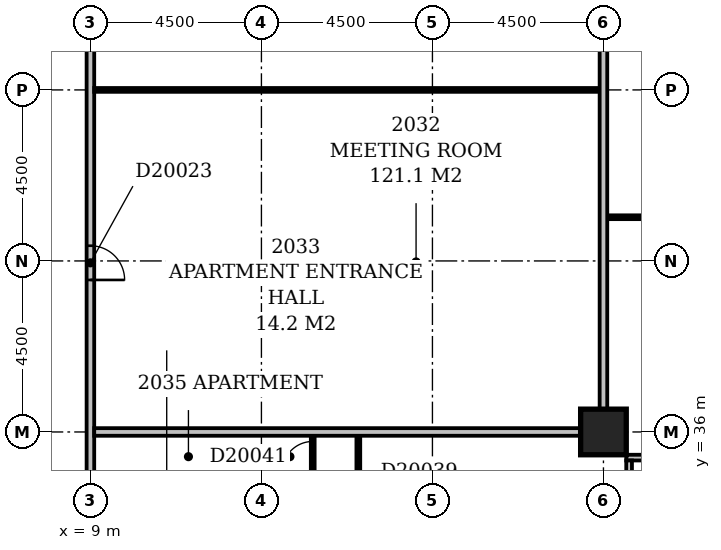
"""IFC4 building model, lengths in metres.
Left out: names, types, materials, properties, quantities, classifications, styles, units other than length and angle.
Written with IfcOpenShell. Run it as: python <this file> out.ifc"""

import sys

from ifc_helpers import new_model, si_unit, direction, frame, frame_2d, origin, origin_2d, place, context, subcontext, project, spatial, rectangle, extrude, element, fill, save


model = new_model("IFC4")
c1 = context("Model", 3, precision=1e-05, world=origin(), true_north=direction((0.0, 1.0)))
c2 = subcontext(c1, "Body", "Model", "MODEL_VIEW")
j1 = project(units=[si_unit("LENGTHUNIT", "METRE"), si_unit("PLANEANGLEUNIT", "RADIAN")], contexts=[c1])
p1 = place(None, origin())
s1 = spatial("IfcSite", under=j1, at=p1, CompositionType="ELEMENT")
p2 = place(p1, origin())
s2 = spatial("IfcBuilding", under=s1, at=p2, CompositionType="ELEMENT")
p3 = place(p2, frame((0.0, 0.0, 83.0)))
s3 = spatial("IfcBuildingStorey", under=s2, at=p3, CompositionType="ELEMENT", Elevation=83.0)
p4 = place(p3, frame((22.5, 36.0, -0.3), z_axis=(0.0, 0.0, 1.0), x_axis=(1.0, 0.0, 0.0)))
e1 = element("IfcColumn", 1, at=p4, inside=s3, PredefinedType="COLUMN", context=c2, shape_type="SweptSolid", body=[
    extrude(rectangle(XDim=1.2, YDim=1.2, at=origin_2d()), origin(), (0.0, 0.0, 1.0), 3.6),
])
p5 = place(p3, frame((23.175, 17.4, 0.0), z_axis=(0.0, 0.0, 1.0), x_axis=(0.0, 1.0, 0.0)))
e2 = element("IfcWall", 2, at=p5, inside=s3, PredefinedType="STANDARD", context=c2, shape_type="SweptSolid", body=[
    extrude(rectangle(XDim=17.85, YDim=0.15, at=frame_2d((8.925, 0.0))), origin(), (0.0, 0.0, 1.0), 2.7),
])
p6 = place(p5, frame((1.65, 0.0, 0.6)))
e3 = element("IfcOpeningElement", 3, at=p6, cuts=e2, PredefinedType="OPENING", context=c2, shape_type="SweptSolid", body=[
    extrude(rectangle(XDim=2.4, YDim=1.8, at=frame_2d((1.2, 0.9))), frame((0.0, 0.087, 0.0), z_axis=(0.0, -1.0, 0.0), x_axis=(1.0, 0.0, 0.0)), (0.0, 0.0, 1.0), 0.174),
])
p7 = place(p5, frame((5.926, 0.0, 0.6)))
e4 = element("IfcOpeningElement", 4, at=p7, cuts=e2, PredefinedType="OPENING", context=c2, shape_type="SweptSolid", body=[
    extrude(rectangle(XDim=0.45, YDim=1.8, at=frame_2d((0.225, 0.9))), frame((0.0, 0.087, 0.0), z_axis=(0.0, -1.0, 0.0), x_axis=(1.0, 0.0, 0.0)), (0.0, 0.0, 1.0), 0.174),
])
p8 = place(p5, frame((10.65, 0.0, 0.6)))
e5 = element("IfcOpeningElement", 5, at=p8, cuts=e2, PredefinedType="OPENING", context=c2, shape_type="SweptSolid", body=[
    extrude(rectangle(XDim=2.4, YDim=1.8, at=frame_2d((1.2, 0.9))), frame((0.0, 0.087, 0.0), z_axis=(0.0, -1.0, 0.0), x_axis=(1.0, 0.0, 0.0)), (0.0, 0.0, 1.0), 0.174),
])
p9 = place(p5, frame((15.15, 0.0, 0.6)))
e6 = element("IfcOpeningElement", 6, at=p9, cuts=e2, PredefinedType="OPENING", context=c2, shape_type="SweptSolid", body=[
    extrude(rectangle(XDim=2.4, YDim=1.8, at=frame_2d((1.2, 0.9))), frame((0.0, 0.087, 0.0), z_axis=(0.0, -1.0, 0.0), x_axis=(1.0, 0.0, 0.0)), (0.0, 0.0, 1.0), 0.174),
])
p10 = place(p3, frame((23.1, 35.325, 0.0), z_axis=(0.0, 0.0, 1.0), x_axis=(1.0, 0.0, 0.0)))
e7 = element("IfcWall", 7, at=p10, inside=s3, PredefinedType="STANDARD", context=c2, shape_type="SweptSolid", body=[
    extrude(rectangle(XDim=45.15, YDim=0.15, at=frame_2d((22.575, 0.0))), origin(), (0.0, 0.0, 1.0), 2.7),
])
p11 = place(p10, frame((0.45, 0.0, 0.6)))
e8 = element("IfcOpeningElement", 8, at=p11, cuts=e7, PredefinedType="OPENING", context=c2, shape_type="SweptSolid", body=[
    extrude(rectangle(XDim=2.4, YDim=1.8, at=frame_2d((1.2, 0.9))), frame((0.0, 0.087, 0.0), z_axis=(0.0, -1.0, 0.0), x_axis=(1.0, 0.0, 0.0)), (0.0, 0.0, 1.0), 0.174),
])
p12 = place(p10, frame((6.366, 0.0, 0.6)))
e9 = element("IfcOpeningElement", 9, at=p12, cuts=e7, PredefinedType="OPENING", context=c2, shape_type="SweptSolid", body=[
    extrude(rectangle(XDim=1.2, YDim=1.8, at=frame_2d((0.6, 0.9))), frame((0.0, 0.087, 0.0), z_axis=(0.0, -1.0, 0.0), x_axis=(1.0, 0.0, 0.0)), (0.0, 0.0, 1.0), 0.174),
])
p13 = place(p10, frame((9.45, 0.0, 0.6)))
e10 = element("IfcOpeningElement", 10, at=p13, cuts=e7, PredefinedType="OPENING", context=c2, shape_type="SweptSolid", body=[
    extrude(rectangle(XDim=2.4, YDim=1.8, at=frame_2d((1.2, 0.9))), frame((0.0, 0.087, 0.0), z_axis=(0.0, -1.0, 0.0), x_axis=(1.0, 0.0, 0.0)), (0.0, 0.0, 1.0), 0.174),
])
p14 = place(p10, frame((13.95, 0.0, 0.6)))
e11 = element("IfcOpeningElement", 11, at=p14, cuts=e7, PredefinedType="OPENING", context=c2, shape_type="SweptSolid", body=[
    extrude(rectangle(XDim=2.4, YDim=1.8, at=frame_2d((1.2, 0.9))), frame((0.0, 0.087, 0.0), z_axis=(0.0, -1.0, 0.0), x_axis=(1.0, 0.0, 0.0)), (0.0, 0.0, 1.0), 0.174),
])
p15 = place(p10, frame((18.21, 0.0, 0.6)))
e12 = element("IfcOpeningElement", 12, at=p15, cuts=e7, PredefinedType="OPENING", context=c2, shape_type="SweptSolid", body=[
    extrude(rectangle(XDim=1.8, YDim=1.8, at=frame_2d((0.9, 0.9))), frame((0.0, 0.087, 0.0), z_axis=(0.0, -1.0, 0.0), x_axis=(1.0, 0.0, 0.0)), (0.0, 0.0, 1.0), 0.174),
])
p16 = place(p10, frame((22.95, 0.0, 0.6)))
e13 = element("IfcOpeningElement", 13, at=p16, cuts=e7, PredefinedType="OPENING", context=c2, shape_type="SweptSolid", body=[
    extrude(rectangle(XDim=2.4, YDim=1.8, at=frame_2d((1.2, 0.9))), frame((0.0, 0.087, 0.0), z_axis=(0.0, -1.0, 0.0), x_axis=(1.0, 0.0, 0.0)), (0.0, 0.0, 1.0), 0.174),
])
p17 = place(p10, frame((27.45, 0.0, 0.6)))
e14 = element("IfcOpeningElement", 14, at=p17, cuts=e7, PredefinedType="OPENING", context=c2, shape_type="SweptSolid", body=[
    extrude(rectangle(XDim=2.4, YDim=1.8, at=frame_2d((1.2, 0.9))), frame((0.0, 0.087, 0.0), z_axis=(0.0, -1.0, 0.0), x_axis=(1.0, 0.0, 0.0)), (0.0, 0.0, 1.0), 0.174),
])
p18 = place(p10, frame((31.831, 0.0, 0.6)))
e15 = element("IfcOpeningElement", 15, at=p18, cuts=e7, PredefinedType="OPENING", context=c2, shape_type="SweptSolid", body=[
    extrude(rectangle(XDim=0.6, YDim=1.8, at=frame_2d((0.3, 0.9))), frame((0.0, 0.087, 0.0), z_axis=(0.0, -1.0, 0.0), x_axis=(1.0, 0.0, 0.0)), (0.0, 0.0, 1.0), 0.174),
])
p19 = place(p10, frame((36.45, 0.0, 0.6)))
e16 = element("IfcOpeningElement", 16, at=p19, cuts=e7, PredefinedType="OPENING", context=c2, shape_type="SweptSolid", body=[
    extrude(rectangle(XDim=2.4, YDim=1.8, at=frame_2d((1.2, 0.9))), frame((0.0, 0.087, 0.0), z_axis=(0.0, -1.0, 0.0), x_axis=(1.0, 0.0, 0.0)), (0.0, 0.0, 1.0), 0.174),
])
p20 = place(p10, frame((40.95, 0.0, 0.6)))
e17 = element("IfcOpeningElement", 17, at=p20, cuts=e7, PredefinedType="OPENING", context=c2, shape_type="SweptSolid", body=[
    extrude(rectangle(XDim=2.4, YDim=1.8, at=frame_2d((1.2, 0.9))), frame((0.0, 0.087, 0.0), z_axis=(0.0, -1.0, 0.0), x_axis=(1.0, 0.0, 0.0)), (0.0, 0.0, 1.0), 0.174),
])
p21 = place(p3, frame((9.0, 5.0, 0.0), z_axis=(0.0, 0.0, 1.0), x_axis=(0.0, 1.0, 0.0)))
e18 = element("IfcWall", 18, at=p21, inside=s3, PredefinedType="PARTITIONING", context=c2, shape_type="SweptSolid", body=[
    extrude(rectangle(XDim=44.5, YDim=0.2, at=frame_2d((22.25, 0.0))), origin(), (0.0, 0.0, 1.0), 3.3),
])
p22 = place(p21, frame((28.45, 0.0, 0.0)))
e19 = element("IfcOpeningElement", 19, at=p22, cuts=e18, PredefinedType="OPENING", context=c2, shape_type="SweptSolid", body=[
    extrude(rectangle(XDim=1.0, YDim=2.1, at=frame_2d((0.5, 1.05))), frame((0.0, 0.112, 0.0), z_axis=(0.0, -1.0, 0.0), x_axis=(1.0, 0.0, 0.0)), (0.0, 0.0, 1.0), 0.224),
])
p23 = place(p21, frame((22.8, 0.0, 0.0)))
e20 = element("IfcOpeningElement", 20, at=p23, cuts=e18, PredefinedType="OPENING", context=c2, shape_type="SweptSolid", body=[
    extrude(rectangle(XDim=1.0, YDim=2.1, at=frame_2d((0.5, 1.05))), frame((0.0, 0.112, 0.0), z_axis=(0.0, -1.0, 0.0), x_axis=(1.0, 0.0, 0.0)), (0.0, 0.0, 1.0), 0.224),
])
p24 = place(p21, frame((14.55, 0.0, 0.0)))
e21 = element("IfcOpeningElement", 21, at=p24, cuts=e18, PredefinedType="OPENING", context=c2, shape_type="SweptSolid", body=[
    extrude(rectangle(XDim=1.0, YDim=2.1, at=frame_2d((0.5, 1.05))), frame((0.0, 0.112, 0.0), z_axis=(0.0, -1.0, 0.0), x_axis=(1.0, 0.0, 0.0)), (0.0, 0.0, 1.0), 0.224),
])
p25 = place(p21, frame((9.3, 0.0, 0.0)))
e22 = element("IfcOpeningElement", 22, at=p25, cuts=e18, PredefinedType="OPENING", context=c2, shape_type="SweptSolid", body=[
    extrude(rectangle(XDim=1.0, YDim=2.1, at=frame_2d((0.5, 1.05))), frame((0.0, 0.112, 0.0), z_axis=(0.0, -1.0, 0.0), x_axis=(1.0, 0.0, 0.0)), (0.0, 0.0, 1.0), 0.224),
])
p26 = place(p21, frame((35.0, 0.0, 0.0)))
e23 = element("IfcOpeningElement", 23, at=p26, cuts=e18, PredefinedType="OPENING", context=c2, shape_type="SweptSolid", body=[
    extrude(rectangle(XDim=0.9, YDim=2.1, at=frame_2d((0.45, 1.05))), frame((0.0, 0.112, 0.0), z_axis=(0.0, -1.0, 0.0), x_axis=(1.0, 0.0, 0.0)), (0.0, 0.0, 1.0), 0.224),
])
p27 = place(p21, frame((1.5, 0.0, 0.0)))
e24 = element("IfcOpeningElement", 24, at=p27, cuts=e18, PredefinedType="OPENING", context=c2, shape_type="SweptSolid", body=[
    extrude(rectangle(XDim=0.9, YDim=2.1, at=frame_2d((0.45, 1.05))), frame((0.0, 0.112, 0.0), z_axis=(0.0, -1.0, 0.0), x_axis=(1.0, 0.0, 0.0)), (0.0, 0.0, 1.0), 0.224),
])
p28 = place(p3, frame((16.05, 31.6, 0.0), z_axis=(0.0, 0.0, 1.0), x_axis=(0.0, 1.0, 0.0)))
e25 = element("IfcWall", 25, at=p28, inside=s3, PredefinedType="PARTITIONING", context=c2, shape_type="SweptSolid", body=[
    extrude(rectangle(XDim=4.3, YDim=0.1, at=frame_2d((2.15, 0.0))), origin(), (0.0, 0.0, 1.0), 3.3),
])
p29 = place(p28, frame((1.7, 0.0, 0.0)))
e26 = element("IfcOpeningElement", 26, at=p29, cuts=e25, PredefinedType="OPENING", context=c2, shape_type="SweptSolid", body=[
    extrude(rectangle(XDim=0.9, YDim=2.1, at=frame_2d((0.45, 1.05))), frame((0.0, 0.062, 0.0), z_axis=(0.0, -1.0, 0.0), x_axis=(1.0, 0.0, 0.0)), (0.0, 0.0, 1.0), 0.124),
])
p30 = place(p3, frame((14.85, 34.7, 0.0), z_axis=(0.0, 0.0, 1.0), x_axis=(0.0, 1.0, 0.0)))
e27 = element("IfcWall", 27, at=p30, inside=s3, PredefinedType="PARTITIONING", context=c2, shape_type="SweptSolid", body=[
    extrude(rectangle(XDim=1.2, YDim=0.1, at=frame_2d((0.6, 0.0))), origin(), (0.0, 0.0, 1.0), 3.3),
])
p31 = place(p30, frame((0.25, 0.0, 0.0)))
e28 = element("IfcOpeningElement", 28, at=p31, cuts=e27, PredefinedType="OPENING", context=c2, shape_type="SweptSolid", body=[
    extrude(rectangle(XDim=0.8, YDim=2.1, at=frame_2d((0.4, 1.05))), frame((0.0, 0.062, 0.0), z_axis=(0.0, -1.0, 0.0), x_axis=(1.0, 0.0, 0.0)), (0.0, 0.0, 1.0), 0.124),
])
p32 = place(p3, frame((9.1, 36.0, 0.0), z_axis=(0.0, 0.0, 1.0), x_axis=(1.0, 0.0, 0.0)))
e29 = element("IfcWall", 29, at=p32, inside=s3, PredefinedType="PARTITIONING", context=c2, shape_type="SweptSolid", body=[
    extrude(rectangle(XDim=12.8, YDim=0.2, at=frame_2d((6.4, 0.0))), origin(), (0.0, 0.0, 1.0), 2.4),
])
p33 = place(p3, frame((22.5, 36.6, 0.0), z_axis=(0.0, 0.0, 1.0), x_axis=(0.0, 1.0, 0.0)))
e30 = element("IfcWall", 30, at=p33, inside=s3, PredefinedType="PARTITIONING", context=c2, shape_type="SweptSolid", body=[
    extrude(rectangle(XDim=12.8, YDim=0.2, at=frame_2d((6.4, 0.0))), origin(), (0.0, 0.0, 1.0), 3.3),
])
p34 = place(p3, frame((22.6, 41.65, 0.0), z_axis=(0.0, 0.0, 1.0), x_axis=(1.0, 0.0, 0.0)))
e31 = element("IfcWall", 31, at=p34, inside=s3, PredefinedType="PARTITIONING", context=c2, shape_type="SweptSolid", body=[
    extrude(rectangle(XDim=8.8, YDim=0.1, at=frame_2d((4.4, 0.0))), origin(), (0.0, 0.0, 1.0), 3.3),
])
p35 = place(p34, frame((1.7, 0.0, 0.0)))
e32 = element("IfcOpeningElement", 32, at=p35, cuts=e31, PredefinedType="OPENING", context=c2, shape_type="SweptSolid", body=[
    extrude(rectangle(XDim=0.9, YDim=2.1, at=frame_2d((0.45, 1.05))), frame((0.0, 0.062, 0.0), z_axis=(0.0, -1.0, 0.0), x_axis=(1.0, 0.0, 0.0)), (0.0, 0.0, 1.0), 0.124),
])
p36 = place(p34, frame((6.2, 0.0, 0.0)))
e33 = element("IfcOpeningElement", 33, at=p36, cuts=e31, PredefinedType="OPENING", context=c2, shape_type="SweptSolid", body=[
    extrude(rectangle(XDim=0.9, YDim=2.1, at=frame_2d((0.45, 1.05))), frame((0.0, 0.062, 0.0), z_axis=(0.0, -1.0, 0.0), x_axis=(1.0, 0.0, 0.0)), (0.0, 0.0, 1.0), 0.124),
])
p37 = place(p3, frame((9.1, 45.0, 0.0), z_axis=(0.0, 0.0, 1.0), x_axis=(1.0, 0.0, 0.0)))
e34 = element("IfcWall", 34, at=p37, inside=s3, PredefinedType="PARTITIONING", context=c2, shape_type="SweptSolid", body=[
    extrude(rectangle(XDim=13.3, YDim=0.1, at=frame_2d((6.65, 0.0))), origin(), (0.0, 0.0, 1.0), 3.3),
])
p38 = place(p26, frame((0.9, 0.0, 0.0), z_axis=(0.0, 0.0, 1.0), x_axis=(-1.0, 0.0, 0.0)))
e35 = element("IfcDoor", 35, at=p38, inside=s3, OperationType="SINGLE_SWING_RIGHT", PredefinedType="DOOR", context=c2, shape_type="SweptSolid", body=[
    extrude(rectangle(XDim=0.9, YDim=2.1, at=frame_2d((0.45, 1.05))), frame((0.0, 0.025, 0.0), z_axis=(0.0, -1.0, 0.0), x_axis=(1.0, 0.0, 0.0)), (0.0, 0.0, 1.0), 0.05),
])
fill(e23, e35)
p39 = place(p31, origin())
e36 = element("IfcDoor", 36, at=p39, inside=s3, OperationType="SINGLE_SWING_LEFT", PredefinedType="DOOR", context=c2, shape_type="SweptSolid", body=[
    extrude(rectangle(XDim=0.8, YDim=2.1, at=frame_2d((0.4, 1.05))), frame((0.0, 0.025, 0.0), z_axis=(0.0, -1.0, 0.0), x_axis=(1.0, 0.0, 0.0)), (0.0, 0.0, 1.0), 0.05),
])
fill(e28, e36)
save(model, sys.argv[1])
